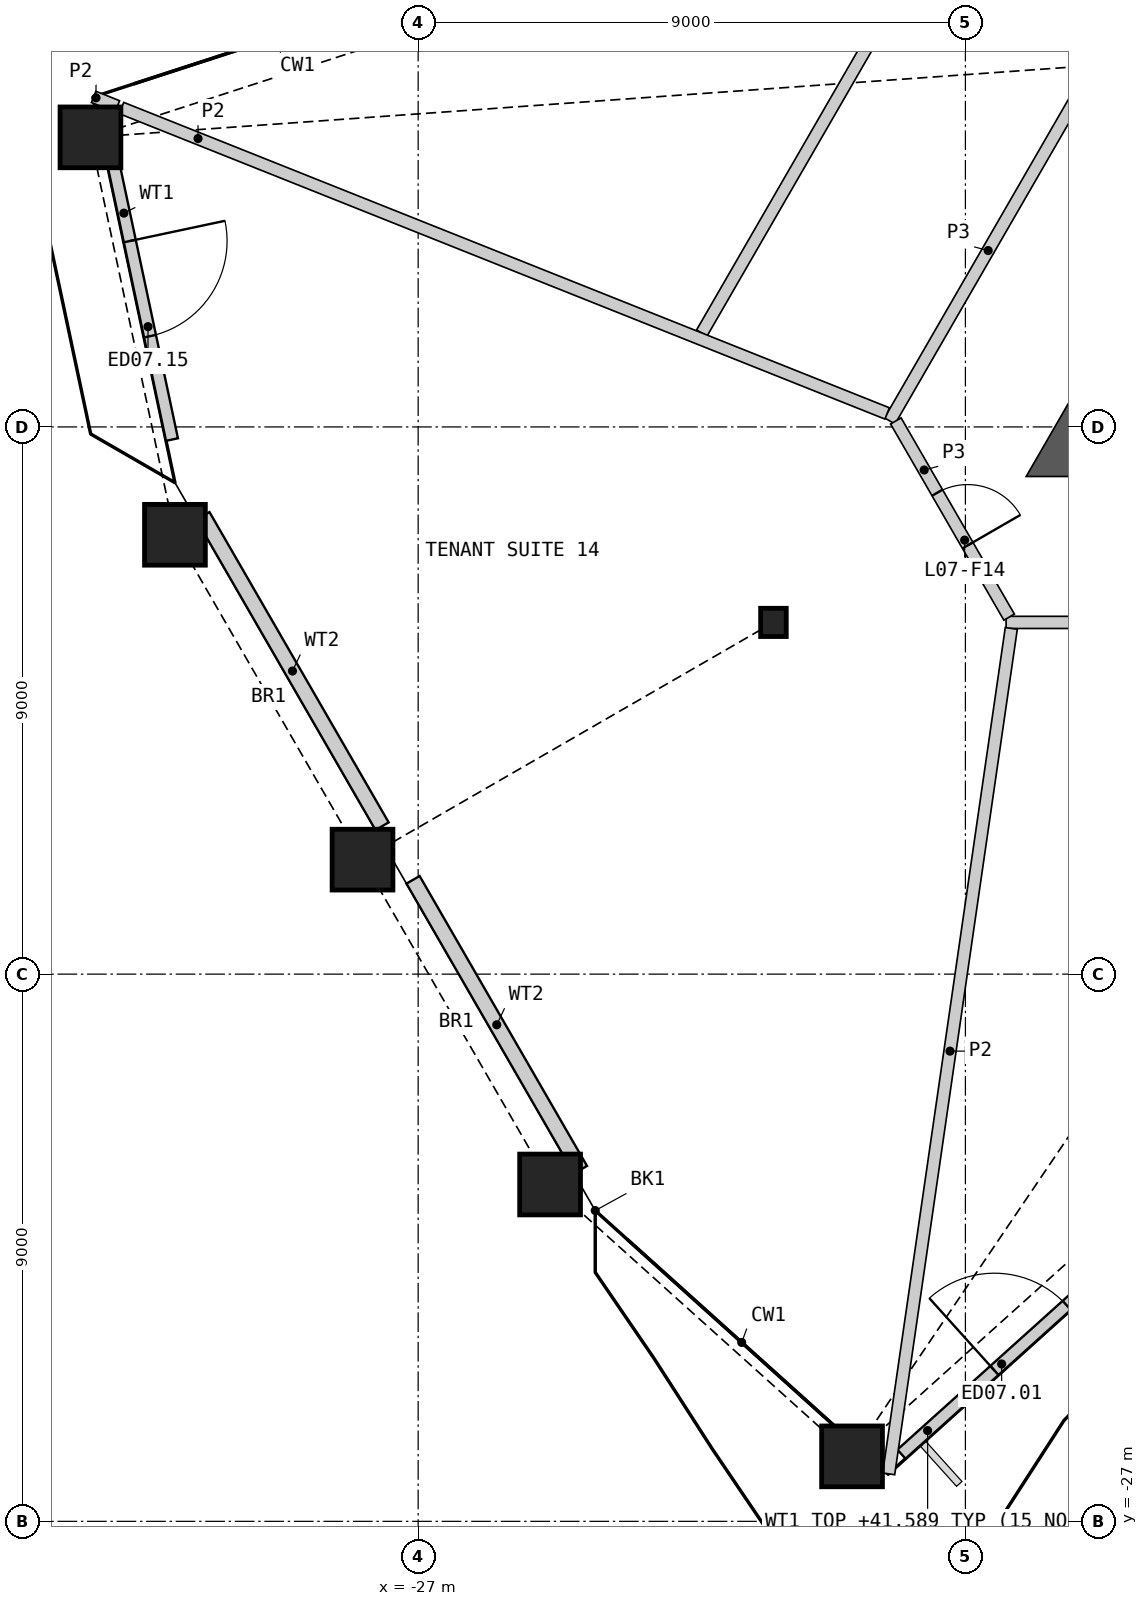
"""IFC4 building model, lengths in metres.
Left out: names, types, materials, properties, quantities, classifications, styles, units other than length and angle.
Written with IfcOpenShell. Run it as: python <this file> out.ifc"""

import sys

from ifc_helpers import new_model, si_unit, direction, frame, frame_2d, origin, origin_2d, place, context, subcontext, project, spatial, polyline, rectangle, hollow_rectangle, i_section, outline, extrude, element, fill, save


model = new_model("IFC4")
c1 = context("Model", 3, precision=1e-05, world=origin(), true_north=direction((0.0, 1.0)))
c2 = subcontext(c1, "Body", "Model", "MODEL_VIEW")
j1 = project(units=[si_unit("LENGTHUNIT", "METRE"), si_unit("PLANEANGLEUNIT", "RADIAN")], contexts=[c1])
p1 = place(None, origin())
s1 = spatial("IfcSite", under=j1, at=p1, CompositionType="ELEMENT")
p2 = place(p1, origin())
s2 = spatial("IfcBuilding", under=s1, at=p2, CompositionType="ELEMENT")
p3 = place(p2, frame((0.0, 0.0, 38.4)))
s3 = spatial("IfcBuildingStorey", under=s2, at=p3, CompositionType="ELEMENT", Elevation=38.4)
for number, where, z_axis, x_axis in (
    (1, (-24.83, -21.46, 0.0), (0.0, 0.0, 1.0), (1.0, 0.0, 0.0)),
    (2, (-19.864, -25.931, 0.0), (0.0, 0.0, 1.0), (1.0, 0.0, 0.0)),
    (3, (-32.389, -4.237, 0.0), (0.0, 0.0, 1.0), (1.0, 0.0, 0.0)),
    (4, (-31.0, -10.774, 0.0), (0.0, 0.0, 1.0), (1.0, 0.0, 0.0)),
    (5, (-27.915, -16.117, 0.0), (0.0, 0.0, 1.0), (1.0, 0.0, 0.0)),
):
    element("IfcColumn", number, at=place(p3, frame(where, z_axis=z_axis, x_axis=x_axis)), inside=s3, PredefinedType="COLUMN", context=c2, shape_type="SweptSolid", body=[
        extrude(hollow_rectangle(XDim=1.0, YDim=1.0, WallThickness=0.07, at=origin_2d()), origin(), (0.0, 0.0, 1.0), 4.2),
    ])
p4 = place(p3, frame((-21.157, -12.215, 0.0), z_axis=(0.0, 0.0, 1.0), x_axis=(1.0, 0.0, 0.0)))
e6 = element("IfcColumn", 6, at=p4, inside=s3, PredefinedType="COLUMN", context=c2, shape_type="SweptSolid", body=[
    extrude(i_section(OverallWidth=0.421, OverallDepth=0.465, WebThickness=0.045, FlangeThickness=0.072, at=origin_2d()), origin(), (0.0, 0.0, 1.0), 4.2),
])
p5 = place(p3, frame((-19.052, -25.895, 0.0), z_axis=(0.0, 0.0, 1.0), x_axis=(0.743145322323, 0.669130054556, 0.0)))
e7 = element("IfcWall", 7, at=p5, inside=s3, PredefinedType="SOLIDWALL", context=c2, shape_type="SweptSolid", body=[
    extrude(rectangle(XDim=5.792, YDim=0.2, at=frame_2d((2.896, 0.0))), origin(), (0.0, 0.0, 1.0), 3.189),
])
p6 = place(p5, frame((2.057, 0.0, 0.0)))
e8 = element("IfcOpeningElement", 8, at=p6, cuts=e7, PredefinedType="OPENING", context=c2, shape_type="SweptSolid", body=[
    extrude(rectangle(XDim=1.6, YDim=2.4, at=frame_2d((0.8, 1.2))), frame((0.0, 0.11, 0.0), z_axis=(0.0, -1.0, 0.0), x_axis=(1.0, 0.0, 0.0)), (0.0, 0.0, 1.0), 0.22),
])
p7 = place(p3, frame((-32.104, -4.242, 0.0), z_axis=(0.0, 0.0, 1.0), x_axis=(0.207903044531, -0.978149438519, 0.0)))
e9 = element("IfcWall", 9, at=p7, inside=s3, PredefinedType="SOLIDWALL", context=c2, shape_type="SweptSolid", body=[
    extrude(rectangle(XDim=5.076, YDim=0.2, at=frame_2d((2.538, 0.0))), origin(), (0.0, 0.0, 1.0), 3.189),
])
p8 = place(p7, frame((1.738, 0.0, 0.0)))
e10 = element("IfcOpeningElement", 10, at=p8, cuts=e9, PredefinedType="OPENING", context=c2, shape_type="SweptSolid", body=[
    extrude(rectangle(XDim=1.6, YDim=2.4, at=frame_2d((0.8, 1.2))), frame((0.0, 0.11, 0.0), z_axis=(0.0, -1.0, 0.0), x_axis=(1.0, 0.0, 0.0)), (0.0, 0.0, 1.0), 0.22),
])
p9 = place(p3, frame((-30.54, -10.463, 0.0), z_axis=(0.0, 0.0, 1.0), x_axis=(0.500010498135, -0.866019342599, 0.0)))
e11 = element("IfcWall", 11, at=p9, inside=s3, PredefinedType="SOLIDWALL", context=c2, shape_type="SweptSolid", body=[
    extrude(rectangle(XDim=5.894, YDim=0.25, at=frame_2d((2.947, 0.0))), origin(), (0.0, 0.0, 1.0), 3.189),
])
p10 = place(p3, frame((-27.084, -16.449, 0.0), z_axis=(0.0, 0.0, 1.0), x_axis=(0.500006469283, -0.86602166871, 0.0)))
e12 = element("IfcWall", 12, at=p10, inside=s3, PredefinedType="SOLIDWALL", context=c2, shape_type="SweptSolid", body=[
    extrude(rectangle(XDim=5.506, YDim=0.25, at=frame_2d((2.753, 0.0))), origin(), (0.0, 0.0, 1.0), 3.189),
])
p11 = place(p3, origin())
e13 = element("IfcWall", 13, at=p11, inside=s3, PredefinedType="SHEAR", context=c2, shape_type="SweptSolid", body=[
    extrude(outline(polyline([(-16.221, -8.465), (-15.441, -8.915), (-15.441, -9.815), (-17.0, -9.815), (-16.221, -8.465)])), origin(), (0.0, 0.0, 1.0), 3.8),
])
p12 = place(p3, frame((-17.331, -12.215, 0.0), z_axis=(0.0, 0.0, 1.0), x_axis=(1.0, 0.0, 0.0)))
e14 = element("IfcWall", 14, at=p12, inside=s3, PredefinedType="PARTITIONING", context=c2, shape_type="SweptSolid", body=[
    extrude(rectangle(XDim=6.51, YDim=0.2, at=frame_2d((3.255, 0.0))), origin(), (0.0, 0.0, 1.0), 3.8),
])
p13 = place(p12, frame((2.455, 0.0, 0.0)))
e15 = element("IfcOpeningElement", 15, at=p13, cuts=e14, PredefinedType="OPENING", context=c2, shape_type="SweptSolid", body=[
    extrude(rectangle(XDim=1.8, YDim=2.1, at=frame_2d((0.9, 1.05))), frame((0.0, 0.11, 0.0), z_axis=(0.0, -1.0, 0.0), x_axis=(1.0, 0.0, 0.0)), (0.0, 0.0, 1.0), 0.22),
])
p14 = place(p3, frame((-19.244, -8.902, 0.0), z_axis=(0.0, 0.0, 1.0), x_axis=(0.499984737558, 0.86603421538, 0.0)))
e16 = element("IfcWall", 16, at=p14, inside=s3, PredefinedType="PARTITIONING", context=c2, shape_type="SweptSolid", body=[
    extrude(rectangle(XDim=6.473, YDim=0.2, at=frame_2d((3.236, 0.0))), origin(), (0.0, 0.0, 1.0), 3.8),
])
p15 = place(p3, frame((-19.144, -8.902, 0.0), z_axis=(0.0, 0.0, 1.0), x_axis=(0.499958791762, -0.866049194065, 0.0)))
e17 = element("IfcWall", 17, at=p15, inside=s3, PredefinedType="PARTITIONING", context=c2, shape_type="SweptSolid", body=[
    extrude(rectangle(XDim=3.726, YDim=0.2, at=frame_2d((1.863, 0.0))), origin(), (0.0, 0.0, 1.0), 3.8),
])
p16 = place(p15, frame((1.363, 0.0, 0.0)))
e18 = element("IfcOpeningElement", 18, at=p16, cuts=e17, PredefinedType="OPENING", context=c2, shape_type="SweptSolid", body=[
    extrude(rectangle(XDim=1.0, YDim=2.1, at=frame_2d((0.5, 1.05))), frame((0.0, 0.11, 0.0), z_axis=(0.0, -1.0, 0.0), x_axis=(1.0, 0.0, 0.0)), (0.0, 0.0, 1.0), 0.22),
])
p17 = place(p3, frame((-22.335, -7.455, 0.0), z_axis=(0.0, 0.0, 1.0), x_axis=(0.499997414609, 0.866026896456, 0.0)))
e19 = element("IfcWall", 19, at=p17, inside=s3, PredefinedType="PARTITIONING", context=c2, shape_type="SweptSolid", body=[
    extrude(rectangle(XDim=17.524, YDim=0.2, at=frame_2d((8.762, 0.0))), origin(), (0.0, 0.0, 1.0), 2.885),
])
p18 = place(p17, frame((7.584, 0.0, 0.0)))
e20 = element("IfcOpeningElement", 20, at=p18, cuts=e19, PredefinedType="OPENING", context=c2, shape_type="SweptSolid", body=[
    extrude(rectangle(XDim=0.95, YDim=2.1, at=frame_2d((0.475, 1.05))), frame((0.0, 0.11, 0.0), z_axis=(0.0, -1.0, 0.0), x_axis=(1.0, 0.0, 0.0)), (0.0, 0.0, 1.0), 0.22),
])
p19 = place(p3, frame((-19.262, -26.219, 0.0), z_axis=(0.0, 0.0, 1.0), x_axis=(0.143525263071, 0.989646653539, 0.0)))
e21 = element("IfcWall", 21, at=p19, inside=s3, PredefinedType="PARTITIONING", context=c2, shape_type="SweptSolid", body=[
    extrude(rectangle(XDim=14.051, YDim=0.2, at=frame_2d((7.025, 0.0))), origin(), (0.0, 0.0, 1.0), 2.885),
])
p20 = place(p3, frame((-31.879, -3.754, 0.0), z_axis=(0.0, 0.0, 1.0), x_axis=(0.928821541656, -0.370527385973, 0.0)))
e22 = element("IfcWall", 22, at=p20, inside=s3, PredefinedType="PARTITIONING", context=c2, shape_type="SweptSolid", body=[
    extrude(rectangle(XDim=13.558, YDim=0.2, at=frame_2d((6.779, 0.0))), origin(), (0.0, 0.0, 1.0), 2.885),
])
p21 = place(p3, frame((-32.337, -3.572, 0.0), z_axis=(0.0, 0.0, 1.0), x_axis=(0.928757356094, -0.370688243003, 0.0)))
e23 = element("IfcWall", 23, at=p21, inside=s3, PredefinedType="PARTITIONING", context=c2, shape_type="SweptSolid", body=[
    extrude(rectangle(XDim=0.419, YDim=0.2, at=frame_2d((0.21, 0.0))), origin(), (0.0, 0.0, 1.0), 2.885),
])
p22 = place(p6, origin())
e24 = element("IfcDoor", 24, at=p22, inside=s3, OperationType="DOUBLE_DOOR_SINGLE_SWING", PredefinedType="DOOR", context=c2, shape_type="SweptSolid", body=[
    extrude(rectangle(XDim=1.6, YDim=2.4, at=frame_2d((0.8, 1.2))), frame((0.0, 0.025, 0.0), z_axis=(0.0, -1.0, 0.0), x_axis=(1.0, 0.0, 0.0)), (0.0, 0.0, 1.0), 0.05),
])
fill(e8, e24)
p23 = place(p8, origin())
e25 = element("IfcDoor", 25, at=p23, inside=s3, OperationType="DOUBLE_DOOR_SINGLE_SWING", PredefinedType="DOOR", context=c2, shape_type="SweptSolid", body=[
    extrude(rectangle(XDim=1.6, YDim=2.4, at=frame_2d((0.8, 1.2))), frame((0.0, 0.025, 0.0), z_axis=(0.0, -1.0, 0.0), x_axis=(1.0, 0.0, 0.0)), (0.0, 0.0, 1.0), 0.05),
])
fill(e10, e25)
p24 = place(p16, origin())
e26 = element("IfcDoor", 26, at=p24, inside=s3, OperationType="SINGLE_SWING_RIGHT", PredefinedType="DOOR", context=c2, shape_type="SweptSolid", body=[
    extrude(rectangle(XDim=1.0, YDim=2.1, at=frame_2d((0.5, 1.05))), frame((0.0, 0.025, 0.0), z_axis=(0.0, -1.0, 0.0), x_axis=(1.0, 0.0, 0.0)), (0.0, 0.0, 1.0), 0.05),
])
fill(e18, e26)
save(model, sys.argv[1])
